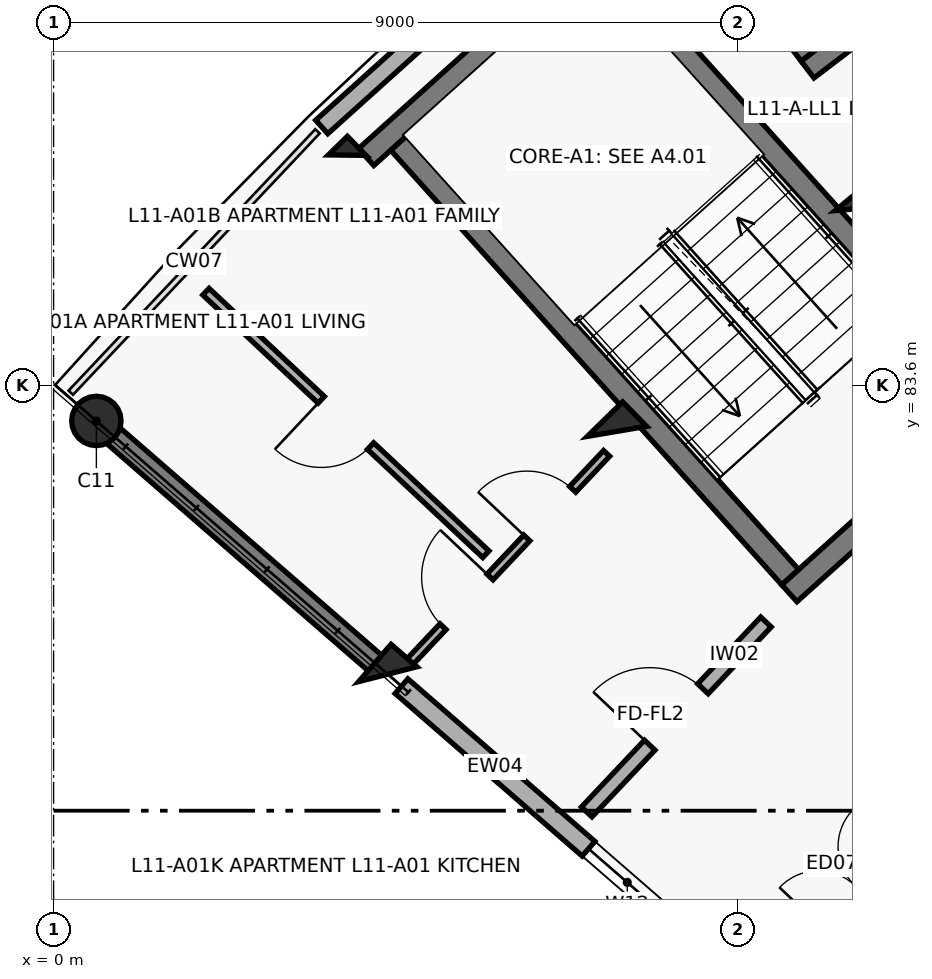
"""IFC4 building model, lengths in metres.
Left out: names, types, materials, properties, quantities, classifications, styles, units other than length and angle.
Written with IfcOpenShell. Run it as: python <this file> out.ifc"""

import sys

from ifc_helpers import new_model, si_unit, direction, frame, frame_2d, origin, origin_2d, place, context, subcontext, project, spatial, rectangle, circle, extrude, element, fill, save


model = new_model("IFC4")
c1 = context("Model", 3, precision=1e-05, world=origin(), true_north=direction((0.0, 1.0)))
c2 = subcontext(c1, "Body", "Model", "MODEL_VIEW")
j1 = project(units=[si_unit("LENGTHUNIT", "METRE"), si_unit("PLANEANGLEUNIT", "RADIAN")], contexts=[c1])
p1 = place(None, origin())
s1 = spatial("IfcSite", under=j1, at=p1, CompositionType="ELEMENT")
p2 = place(p1, origin())
s2 = spatial("IfcBuilding", under=s1, at=p2, CompositionType="ELEMENT")
p3 = place(p2, frame((0.0, 0.0, 36.0)))
s3 = spatial("IfcBuildingStorey", under=s2, at=p3, CompositionType="ELEMENT", Elevation=36.0)
p4 = place(p3, frame((4.397, 79.796, 0.0), z_axis=(0.0, 0.0, 1.0), x_axis=(-0.754709580223, 0.656059028991, 0.0)))
e1 = element("IfcColumn", 1, at=p4, inside=s3, PredefinedType="COLUMN", context=c2, shape_type="SweptSolid", body=[
    extrude(rectangle(XDim=0.45, YDim=0.65, at=origin_2d()), origin(), (0.0, 0.0, 1.0), 3.1),
])
p5 = place(p3, frame((0.563, 83.129, 0.0), z_axis=(0.0, 0.0, 1.0), x_axis=(-0.754709580223, 0.656059028991, 0.0)))
e2 = element("IfcColumn", 2, at=p5, inside=s3, PredefinedType="COLUMN", context=c2, shape_type="SweptSolid", body=[
    extrude(circle(Radius=0.325, at=origin_2d()), origin(), (0.0, 0.0, 1.0), 3.1),
])
p6 = place(p3, frame((7.412, 82.991, 0.0), z_axis=(0.0, 0.0, 1.0), x_axis=(-0.698665066769, 0.715448897181, 0.0)))
e3 = element("IfcColumn", 3, at=p6, inside=s3, PredefinedType="COLUMN", context=c2, shape_type="SweptSolid", body=[
    extrude(rectangle(XDim=0.45, YDim=0.65, at=origin_2d()), origin(), (0.0, 0.0, 1.0), 3.1),
])
p7 = place(p3, frame((3.863, 86.626, 0.0), z_axis=(0.0, 0.0, 1.0), x_axis=(-0.698665066769, 0.715448897181, 0.0)))
e4 = element("IfcColumn", 4, at=p7, inside=s3, PredefinedType="COLUMN", context=c2, shape_type="SweptSolid", body=[
    extrude(rectangle(XDim=0.35, YDim=0.35, at=origin_2d()), origin(), (0.0, 0.0, 1.0), 3.1),
])
p8 = place(p3, frame((10.678, 85.93, 0.0), z_axis=(0.0, 0.0, 1.0), x_axis=(-0.637961754089, 0.770068049148, 0.0)))
e5 = element("IfcColumn", 5, at=p8, inside=s3, PredefinedType="COLUMN", context=c2, shape_type="SweptSolid", body=[
    extrude(rectangle(XDim=0.45, YDim=0.65, at=origin_2d()), origin(), (0.0, 0.0, 1.0), 3.1),
])
p9 = place(p3, frame((4.261, 79.914, 0.0), z_axis=(0.0, 0.0, 1.0), x_axis=(-0.754703505217, 0.65606601742, 0.0)))
e6 = element("IfcWall", 6, at=p9, inside=s3, PredefinedType="SHEAR", context=c2, shape_type="SweptSolid", body=[
    extrude(rectangle(XDim=4.72, YDim=0.27, at=frame_2d((2.36, 0.0))), origin(), (0.0, 0.0, 1.0), 2.86),
])
p10 = place(p3, frame((9.225, 75.625, 0.0), z_axis=(0.0, 0.0, 1.0), x_axis=(0.686296103853, 0.727322251712, 0.0)))
e7 = element("IfcWall", 7, at=p10, inside=s3, PredefinedType="SOLIDWALL", context=c2, shape_type="SweptSolid", body=[
    extrude(rectangle(XDim=3.832, YDim=0.245, at=frame_2d((1.916, 0.0))), origin(), (0.0, 0.0, 1.0), 2.25),
])
p11 = place(p10, frame((1.216, 0.0, 0.0)))
e8 = element("IfcOpeningElement", 8, at=p11, cuts=e7, PredefinedType="OPENING", context=c2, shape_type="SweptSolid", body=[
    extrude(rectangle(XDim=1.4, YDim=2.15, at=frame_2d((0.7, 1.075))), frame((0.0, 0.133, 0.0), z_axis=(0.0, -1.0, 0.0), x_axis=(1.0, 0.0, 0.0)), (0.0, 0.0, 1.0), 0.265),
])
p12 = place(p3, frame((3.528, 86.997, 0.0), z_axis=(0.0, 0.0, 1.0), x_axis=(0.743387539862, 0.668860946369, 0.0)))
e9 = element("IfcWall", 9, at=p12, inside=s3, PredefinedType="SOLIDWALL", context=c2, shape_type="SweptSolid", body=[
    extrude(rectangle(XDim=4.809, YDim=0.238, at=frame_2d((2.405, 0.0))), origin(), (0.0, 0.0, 1.0), 2.25),
])
p13 = place(p3, frame((8.653, 76.096, 0.0), z_axis=(0.0, 0.0, 1.0), x_axis=(-0.754709658894, 0.65605893849, 0.0)))
e10 = element("IfcWall", 10, at=p13, inside=s3, PredefinedType="SOLIDWALL", context=c2, shape_type="SweptSolid", body=[
    extrude(rectangle(XDim=5.4, YDim=0.255, at=frame_2d((2.7, 0.0))), origin(), (0.0, 0.0, 1.0), 2.18),
])
p14 = place(p13, frame((0.79, 0.0, 0.75)))
e11 = element("IfcOpeningElement", 11, at=p14, cuts=e10, PredefinedType="OPENING", context=c2, shape_type="SweptSolid", body=[
    extrude(rectangle(XDim=1.35, YDim=1.35, at=frame_2d((0.675, 0.675))), frame((0.0, 0.137, 0.0), z_axis=(0.0, -1.0, 0.0), x_axis=(1.0, 0.0, 0.0)), (0.0, 0.0, 1.0), 0.275),
])
p15 = place(p3, frame((12.557, 83.45, 0.0), z_axis=(0.0, 0.0, 1.0), x_axis=(-0.743375696158, -0.668874109501, 0.0)))
e12 = element("IfcWall", 12, at=p15, inside=s3, PredefinedType="SHEAR", context=c2, shape_type="SweptSolid", body=[
    extrude(rectangle(XDim=3.87, YDim=0.3, at=frame_2d((1.935, 0.0))), origin(), (0.0, 0.0, 1.0), 3.1),
])
p16 = place(p15, frame((1.435, 0.0, 0.0)))
e13 = element("IfcOpeningElement", 13, at=p16, cuts=e12, PredefinedType="OPENING", context=c2, shape_type="SweptSolid", body=[
    extrude(rectangle(XDim=1.0, YDim=2.15, at=frame_2d((0.5, 1.075))), frame((0.0, 0.16, 0.0), z_axis=(0.0, -1.0, 0.0), x_axis=(1.0, 0.0, 0.0)), (0.0, 0.0, 1.0), 0.32),
])
p17 = place(p3, frame((7.436, 89.59, 0.0), z_axis=(0.0, 0.0, 1.0), x_axis=(-0.743400052815, -0.668847038922, 0.0)))
e14 = element("IfcWall", 14, at=p17, inside=s3, PredefinedType="SHEAR", context=c2, shape_type="SweptSolid", body=[
    extrude(rectangle(XDim=4.47, YDim=0.3, at=frame_2d((2.235, 0.0))), origin(), (0.0, 0.0, 1.0), 3.1),
])
p18 = place(p3, frame((12.345, 83.461, 0.0), z_axis=(0.0, 0.0, 1.0), x_axis=(-0.668868253964, 0.743380964808, 0.0)))
e15 = element("IfcWall", 15, at=p18, inside=s3, PredefinedType="SHEAR", context=c2, shape_type="SweptSolid", body=[
    extrude(rectangle(XDim=7.69, YDim=0.3, at=frame_2d((3.845, 0.0))), origin(), (0.0, 0.0, 1.0), 3.1),
])
p19 = place(p3, frame((9.691, 81.073, 0.0), z_axis=(0.0, 0.0, 1.0), x_axis=(-0.668885797871, 0.743365179038, 0.0)))
e16 = element("IfcWall", 16, at=p19, inside=s3, PredefinedType="SHEAR", context=c2, shape_type="SweptSolid", body=[
    extrude(rectangle(XDim=7.69, YDim=0.3, at=frame_2d((3.845, 0.0))), origin(), (0.0, 0.0, 1.0), 3.1),
])
p20 = place(p3, frame((12.616, 89.807, 0.0), z_axis=(0.0, 0.0, 1.0), x_axis=(-0.795474703455, -0.605986795371, 0.0)))
e17 = element("IfcWall", 17, at=p20, inside=s3, PredefinedType="SHEAR", context=c2, shape_type="SweptSolid", body=[
    extrude(rectangle(XDim=3.39, YDim=0.28, at=frame_2d((1.695, 0.0))), origin(), (0.0, 0.0, 1.0), 3.1),
])
p21 = place(p20, frame((1.095, 0.0, 0.0)))
e18 = element("IfcOpeningElement", 18, at=p21, cuts=e17, PredefinedType="OPENING", context=c2, shape_type="SweptSolid", body=[
    extrude(rectangle(XDim=1.2, YDim=2.15, at=frame_2d((0.6, 1.075))), frame((0.0, 0.15, 0.0), z_axis=(0.0, -1.0, 0.0), x_axis=(1.0, 0.0, 0.0)), (0.0, 0.0, 1.0), 0.3),
])
p22 = place(p3, frame((9.946, 87.949, 0.0), z_axis=(0.0, 0.0, 1.0), x_axis=(-0.605891019062, 0.795547656033, 0.0)))
e19 = element("IfcWall", 19, at=p22, inside=s3, PredefinedType="SHEAR", context=c2, shape_type="SweptSolid", body=[
    extrude(rectangle(XDim=2.03, YDim=0.28, at=frame_2d((1.015, 0.0))), origin(), (0.0, 0.0, 1.0), 3.1),
])
p23 = place(p3, frame((7.014, 77.984, 0.0), z_axis=(0.0, 0.0, 1.0), x_axis=(0.686310507227, 0.727308660522, 0.0)))
e20 = element("IfcWall", 20, at=p23, inside=s3, PredefinedType="SOLIDWALL", context=c2, shape_type="SweptSolid", body=[
    extrude(rectangle(XDim=3.436, YDim=0.19, at=frame_2d((1.718, 0.0))), origin(), (0.0, 0.0, 1.0), 2.08),
])
p24 = place(p23, frame((1.208, 0.0, 0.0)))
e21 = element("IfcOpeningElement", 21, at=p24, cuts=e20, PredefinedType="OPENING", context=c2, shape_type="SweptSolid", body=[
    extrude(rectangle(XDim=1.02, YDim=2.15, at=frame_2d((0.51, 1.075))), frame((0.0, 0.105, 0.0), z_axis=(0.0, -1.0, 0.0), x_axis=(1.0, 0.0, 0.0)), (0.0, 0.0, 1.0), 0.21),
])
p25 = place(p3, frame((4.678, 79.948, 0.0), z_axis=(0.0, 0.0, 1.0), x_axis=(0.686331812627, 0.72728855551, 0.0)))
e22 = element("IfcWall", 22, at=p25, inside=s3, PredefinedType="PARTITIONING", context=c2, shape_type="SweptSolid", body=[
    extrude(rectangle(XDim=3.785, YDim=0.11, at=frame_2d((1.893, 0.0))), origin(), (0.0, 0.0, 1.0), 2.08),
])
p26 = place(p25, frame((0.65, 0.0, 0.0)))
e23 = element("IfcOpeningElement", 23, at=p26, cuts=e22, PredefinedType="OPENING", context=c2, shape_type="SweptSolid", body=[
    extrude(rectangle(XDim=0.9, YDim=2.1, at=frame_2d((0.45, 1.05))), frame((0.0, 0.065, 0.0), z_axis=(0.0, -1.0, 0.0), x_axis=(1.0, 0.0, 0.0)), (0.0, 0.0, 1.0), 0.13),
])
p27 = place(p25, frame((2.255, 0.0, 0.0)))
e24 = element("IfcOpeningElement", 24, at=p27, cuts=e22, PredefinedType="OPENING", context=c2, shape_type="SweptSolid", body=[
    extrude(rectangle(XDim=0.88, YDim=2.1, at=frame_2d((0.44, 1.05))), frame((0.0, 0.065, 0.0), z_axis=(0.0, -1.0, 0.0), x_axis=(1.0, 0.0, 0.0)), (0.0, 0.0, 1.0), 0.13),
])
p28 = place(p3, frame((5.688, 81.375, 0.0), z_axis=(0.0, 0.0, 1.0), x_axis=(-0.72936983679, 0.684119610288, 0.0)))
e25 = element("IfcWall", 25, at=p28, inside=s3, PredefinedType="PARTITIONING", context=c2, shape_type="SweptSolid", body=[
    extrude(rectangle(XDim=5.05, YDim=0.12, at=frame_2d((2.525, 0.0))), origin(), (0.0, 0.0, 1.0), 2.08),
])
p29 = place(p28, frame((2.08, 0.0, 0.0)))
e26 = element("IfcOpeningElement", 26, at=p29, cuts=e25, PredefinedType="OPENING", context=c2, shape_type="SweptSolid", body=[
    extrude(rectangle(XDim=0.89, YDim=2.1, at=frame_2d((0.445, 1.05))), frame((0.0, 0.07, 0.0), z_axis=(0.0, -1.0, 0.0), x_axis=(1.0, 0.0, 0.0)), (0.0, 0.0, 1.0), 0.14),
])
p30 = place(p11, origin())
e27 = element("IfcDoor", 27, at=p30, inside=s3, OperationType="DOUBLE_DOOR_SINGLE_SWING", PredefinedType="DOOR", context=c2, shape_type="SweptSolid", body=[
    extrude(rectangle(XDim=1.4, YDim=2.15, at=frame_2d((0.7, 1.075))), frame((0.0, 0.025, 0.0), z_axis=(0.0, -1.0, 0.0), x_axis=(1.0, 0.0, 0.0)), (0.0, 0.0, 1.0), 0.05),
])
fill(e8, e27)
p31 = place(p14, origin())
e28 = element("IfcWindow", 28, at=p31, inside=s3, PartitioningType="DOUBLE_PANEL_VERTICAL", PredefinedType="WINDOW", context=c2, shape_type="SweptSolid", body=[
    extrude(rectangle(XDim=1.35, YDim=1.35, at=frame_2d((0.675, 0.675))), frame((0.0, 0.03, 0.0), z_axis=(0.0, -1.0, 0.0), x_axis=(1.0, 0.0, 0.0)), (0.0, 0.0, 1.0), 0.06),
])
fill(e11, e28)
p32 = place(p24, origin())
e29 = element("IfcDoor", 29, at=p32, inside=s3, OperationType="SINGLE_SWING_LEFT", PredefinedType="DOOR", context=c2, shape_type="SweptSolid", body=[
    extrude(rectangle(XDim=1.02, YDim=2.15, at=frame_2d((0.51, 1.075))), frame((0.0, 0.025, 0.0), z_axis=(0.0, -1.0, 0.0), x_axis=(1.0, 0.0, 0.0)), (0.0, 0.0, 1.0), 0.05),
])
fill(e21, e29)
p33 = place(p26, origin())
e30 = element("IfcDoor", 30, at=p33, inside=s3, OperationType="SINGLE_SWING_RIGHT", PredefinedType="DOOR", context=c2, shape_type="SweptSolid", body=[
    extrude(rectangle(XDim=0.9, YDim=2.1, at=frame_2d((0.45, 1.05))), frame((0.0, 0.025, 0.0), z_axis=(0.0, -1.0, 0.0), x_axis=(1.0, 0.0, 0.0)), (0.0, 0.0, 1.0), 0.05),
])
fill(e23, e30)
p34 = place(p27, origin())
e31 = element("IfcDoor", 31, at=p34, inside=s3, OperationType="SINGLE_SWING_LEFT", PredefinedType="DOOR", context=c2, shape_type="SweptSolid", body=[
    extrude(rectangle(XDim=0.88, YDim=2.1, at=frame_2d((0.44, 1.05))), frame((0.0, 0.025, 0.0), z_axis=(0.0, -1.0, 0.0), x_axis=(1.0, 0.0, 0.0)), (0.0, 0.0, 1.0), 0.05),
])
fill(e24, e31)
p35 = place(p29, origin())
e32 = element("IfcDoor", 32, at=p35, inside=s3, OperationType="SINGLE_SWING_RIGHT", PredefinedType="DOOR", context=c2, shape_type="SweptSolid", body=[
    extrude(rectangle(XDim=0.89, YDim=2.1, at=frame_2d((0.445, 1.05))), frame((0.0, 0.025, 0.0), z_axis=(0.0, -1.0, 0.0), x_axis=(1.0, 0.0, 0.0)), (0.0, 0.0, 1.0), 0.05),
])
fill(e26, e32)
save(model, sys.argv[1])
